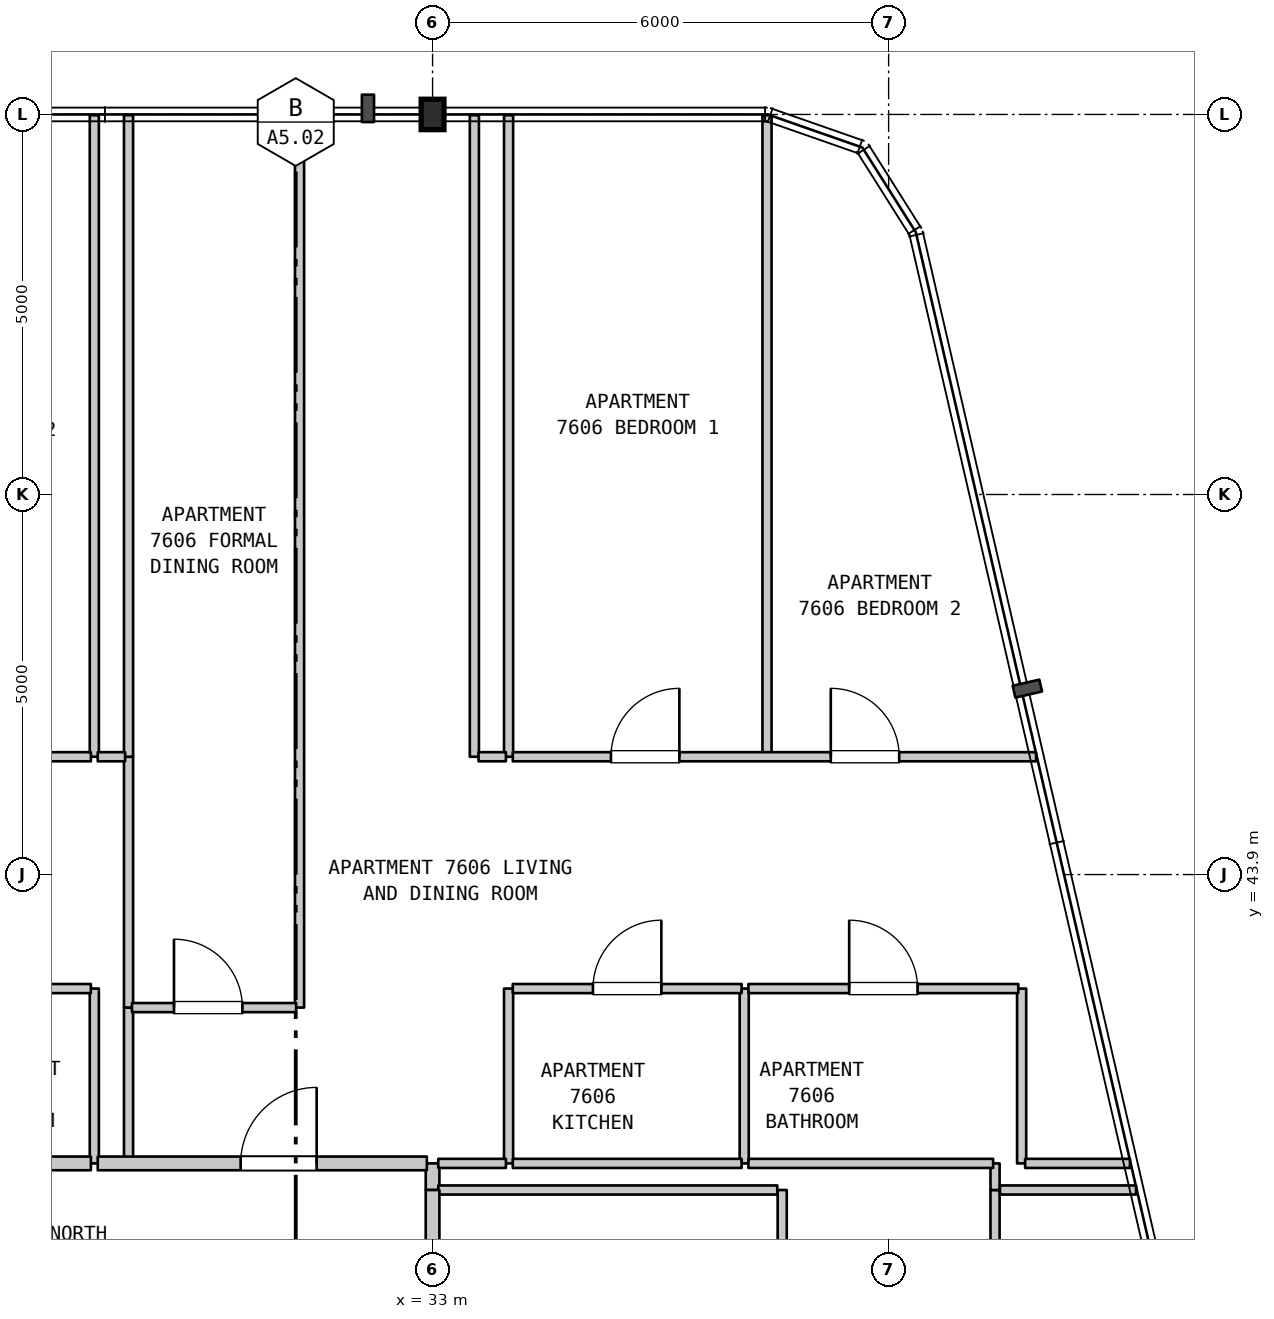
"""IFC4 building model, lengths in metres.
Left out: names, types, materials, properties, quantities, classifications, styles, units other than length and angle.
Written with IfcOpenShell. Run it as: python <this file> out.ifc"""

import sys

from ifc_helpers import new_model, si_unit, direction, frame, frame_2d, origin, origin_2d, place, context, subcontext, project, spatial, rectangle, i_section, extrude, element, fill, save


model = new_model("IFC4")
c1 = context("Model", 3, precision=1e-05, world=origin(), true_north=direction((0.0, 1.0)))
c2 = subcontext(c1, "Body", "Model", "MODEL_VIEW")
j1 = project(units=[si_unit("LENGTHUNIT", "METRE"), si_unit("PLANEANGLEUNIT", "RADIAN")], contexts=[c1])
p1 = place(None, origin())
s1 = spatial("IfcSite", under=j1, at=p1, CompositionType="ELEMENT")
p2 = place(p1, origin())
s2 = spatial("IfcBuilding", under=s1, at=p2, CompositionType="ELEMENT")
p3 = place(p2, frame((0.0, 0.0, 303.6)))
s3 = spatial("IfcBuildingStorey", under=s2, at=p3, CompositionType="ELEMENT", Elevation=303.6)
p4 = place(p3, frame((33.0, 53.9, 0.0), z_axis=(0.0, 0.0, 1.0), x_axis=(1.0, 0.0, 0.0)))
e1 = element("IfcColumn", 1, at=p4, inside=s3, PredefinedType="COLUMN", context=c2, shape_type="SweptSolid", body=[
    extrude(i_section(OverallWidth=0.3, OverallDepth=0.4, WebThickness=0.013, FlangeThickness=0.024, FilletRadius=0.027, at=origin_2d()), origin(), (0.0, 0.0, 1.0), 3.7),
])
p5 = place(p3, frame((28.55, 40.1, 0.0), z_axis=(0.0, 0.0, 1.0), x_axis=(0.0, 1.0, 0.0)))
e2 = element("IfcWall", 2, at=p5, inside=s3, PredefinedType="PARTITIONING", context=c2, shape_type="SweptSolid", body=[
    extrude(rectangle(XDim=2.3, YDim=0.12, at=frame_2d((1.15, 0.0))), origin(), (0.0, 0.0, 1.0), 3.39),
])
p6 = place(p3, frame((28.55, 45.45, 0.0), z_axis=(0.0, 0.0, 1.0), x_axis=(0.0, 1.0, 0.0)))
e3 = element("IfcWall", 3, at=p6, inside=s3, PredefinedType="PARTITIONING", context=c2, shape_type="SweptSolid", body=[
    extrude(rectangle(XDim=8.44, YDim=0.12, at=frame_2d((4.22, 0.0))), origin(), (0.0, 0.0, 1.0), 3.39),
])
p7 = place(p3, frame((29.0, 40.1, 0.0), z_axis=(0.0, 0.0, 1.0), x_axis=(0.0, 1.0, 0.0)))
e4 = element("IfcWall", 4, at=p7, inside=s3, PredefinedType="PARTITIONING", context=c2, shape_type="SweptSolid", body=[
    extrude(rectangle(XDim=2.05, YDim=0.12, at=frame_2d((1.025, 0.0))), origin(), (0.0, 0.0, 1.0), 3.39),
])
p8 = place(p3, frame((29.0, 42.15, 0.0), z_axis=(0.0, 0.0, 1.0), x_axis=(0.0, 1.0, 0.0)))
e5 = element("IfcWall", 5, at=p8, inside=s3, PredefinedType="PARTITIONING", context=c2, shape_type="SweptSolid", body=[
    extrude(rectangle(XDim=3.3, YDim=0.12, at=frame_2d((1.65, 0.0))), origin(), (0.0, 0.0, 1.0), 3.39),
])
p9 = place(p3, frame((29.0, 45.45, 0.0), z_axis=(0.0, 0.0, 1.0), x_axis=(0.0, 1.0, 0.0)))
e6 = element("IfcWall", 6, at=p9, inside=s3, PredefinedType="PARTITIONING", context=c2, shape_type="SweptSolid", body=[
    extrude(rectangle(XDim=8.44, YDim=0.12, at=frame_2d((4.22, 0.0))), origin(), (0.0, 0.0, 1.0), 3.39),
])
p10 = place(p3, frame((31.25, 42.15, 0.0), z_axis=(0.0, 0.0, 1.0), x_axis=(0.0, 1.0, 0.0)))
e7 = element("IfcWall", 7, at=p10, inside=s3, PredefinedType="PARTITIONING", context=c2, shape_type="SweptSolid", body=[
    extrude(rectangle(XDim=11.74, YDim=0.12, at=frame_2d((5.87, 0.0))), origin(), (0.0, 0.0, 1.0), 3.39),
])
p11 = place(p3, frame((33.0, 39.75, 0.0), z_axis=(0.0, 0.0, 1.0), x_axis=(0.0, 1.0, 0.0)))
e8 = element("IfcWall", 8, at=p11, inside=s3, PredefinedType="STANDARD", context=c2, shape_type="SweptSolid", body=[
    extrude(rectangle(XDim=0.35, YDim=0.18, at=frame_2d((0.175, 0.0))), origin(), (0.0, 0.0, 1.0), 3.39),
])
p12 = place(p3, frame((33.55, 45.45, 0.0), z_axis=(0.0, 0.0, 1.0), x_axis=(0.0, 1.0, 0.0)))
e9 = element("IfcWall", 9, at=p12, inside=s3, PredefinedType="PARTITIONING", context=c2, shape_type="SweptSolid", body=[
    extrude(rectangle(XDim=8.44, YDim=0.12, at=frame_2d((4.22, 0.0))), origin(), (0.0, 0.0, 1.0), 3.39),
])
p13 = place(p3, frame((34.0, 40.1, 0.0), z_axis=(0.0, 0.0, 1.0), x_axis=(0.0, 1.0, 0.0)))
e10 = element("IfcWall", 10, at=p13, inside=s3, PredefinedType="PARTITIONING", context=c2, shape_type="SweptSolid", body=[
    extrude(rectangle(XDim=2.3, YDim=0.12, at=frame_2d((1.15, 0.0))), origin(), (0.0, 0.0, 1.0), 3.39),
])
p14 = place(p3, frame((34.0, 45.45, 0.0), z_axis=(0.0, 0.0, 1.0), x_axis=(0.0, 1.0, 0.0)))
e11 = element("IfcWall", 11, at=p14, inside=s3, PredefinedType="PARTITIONING", context=c2, shape_type="SweptSolid", body=[
    extrude(rectangle(XDim=8.44, YDim=0.12, at=frame_2d((4.22, 0.0))), origin(), (0.0, 0.0, 1.0), 3.39),
])
p15 = place(p3, frame((37.1, 40.1, 0.0), z_axis=(0.0, 0.0, 1.0), x_axis=(0.0, 1.0, 0.0)))
e12 = element("IfcWall", 12, at=p15, inside=s3, PredefinedType="PARTITIONING", context=c2, shape_type="SweptSolid", body=[
    extrude(rectangle(XDim=2.3, YDim=0.12, at=frame_2d((1.15, 0.0))), origin(), (0.0, 0.0, 1.0), 3.39),
])
p16 = place(p3, frame((37.4, 45.45, 0.0), z_axis=(0.0, 0.0, 1.0), x_axis=(0.0, 1.0, 0.0)))
e13 = element("IfcWall", 13, at=p16, inside=s3, PredefinedType="PARTITIONING", context=c2, shape_type="SweptSolid", body=[
    extrude(rectangle(XDim=8.44, YDim=0.12, at=frame_2d((4.22, 0.0))), origin(), (0.0, 0.0, 1.0), 3.39),
])
p17 = place(p3, frame((37.6, 37.081, 0.0), z_axis=(0.0, 0.0, 1.0), x_axis=(0.0, 1.0, 0.0)))
e14 = element("IfcWall", 14, at=p17, inside=s3, PredefinedType="PARTITIONING", context=c2, shape_type="SweptSolid", body=[
    extrude(rectangle(XDim=2.669, YDim=0.12, at=frame_2d((1.334, 0.0))), origin(), (0.0, 0.0, 1.0), 3.39),
])
p18 = place(p17, frame((0.814, 0.0, 0.0)))
e15 = element("IfcOpeningElement", 15, at=p18, cuts=e14, PredefinedType="OPENING", context=c2, shape_type="SweptSolid", body=[
    extrude(rectangle(XDim=0.9, YDim=2.15, at=frame_2d((0.45, 1.075))), frame((0.0, 0.07, 0.0), z_axis=(0.0, -1.0, 0.0), x_axis=(1.0, 0.0, 0.0)), (0.0, 0.0, 1.0), 0.14),
])
p19 = place(p3, frame((40.4, 31.9, 0.0), z_axis=(0.0, 0.0, 1.0), x_axis=(0.0, 1.0, 0.0)))
e16 = element("IfcWall", 16, at=p19, inside=s3, PredefinedType="PARTITIONING", context=c2, shape_type="SweptSolid", body=[
    extrude(rectangle(XDim=7.85, YDim=0.12, at=frame_2d((3.925, 0.0))), origin(), (0.0, 0.0, 1.0), 3.39),
])
p20 = place(p19, frame((1.615, 0.0, 0.0)))
e17 = element("IfcOpeningElement", 17, at=p20, cuts=e16, PredefinedType="OPENING", context=c2, shape_type="SweptSolid", body=[
    extrude(rectangle(XDim=0.9, YDim=2.15, at=frame_2d((0.45, 1.075))), frame((0.0, 0.07, 0.0), z_axis=(0.0, -1.0, 0.0), x_axis=(1.0, 0.0, 0.0)), (0.0, 0.0, 1.0), 0.14),
])
p21 = place(p19, frame((5.19, 0.0, 0.0)))
e18 = element("IfcOpeningElement", 18, at=p21, cuts=e16, PredefinedType="OPENING", context=c2, shape_type="SweptSolid", body=[
    extrude(rectangle(XDim=0.9, YDim=2.15, at=frame_2d((0.45, 1.075))), frame((0.0, 0.07, 0.0), z_axis=(0.0, -1.0, 0.0), x_axis=(1.0, 0.0, 0.0)), (0.0, 0.0, 1.0), 0.14),
])
p22 = place(p3, frame((40.4, 39.75, 0.0), z_axis=(0.0, 0.0, 1.0), x_axis=(0.0, 1.0, 0.0)))
e19 = element("IfcWall", 19, at=p22, inside=s3, PredefinedType="PARTITIONING", context=c2, shape_type="SweptSolid", body=[
    extrude(rectangle(XDim=0.35, YDim=0.12, at=frame_2d((0.175, 0.0))), origin(), (0.0, 0.0, 1.0), 3.39),
])
p23 = place(p3, frame((40.75, 40.1, 0.0), z_axis=(0.0, 0.0, 1.0), x_axis=(0.0, 1.0, 0.0)))
e20 = element("IfcWall", 20, at=p23, inside=s3, PredefinedType="PARTITIONING", context=c2, shape_type="SweptSolid", body=[
    extrude(rectangle(XDim=2.3, YDim=0.12, at=frame_2d((1.15, 0.0))), origin(), (0.0, 0.0, 1.0), 3.39),
])
p24 = place(p3, frame((33.075, 39.75, 0.0), z_axis=(0.0, 0.0, 1.0), x_axis=(1.0, 0.0, 0.0)))
e21 = element("IfcWall", 21, at=p24, inside=s3, PredefinedType="PARTITIONING", context=c2, shape_type="SweptSolid", body=[
    extrude(rectangle(XDim=4.46, YDim=0.12, at=frame_2d((2.23, 0.0))), origin(), (0.0, 0.0, 1.0), 3.39),
])
p25 = place(p3, frame((40.465, 39.75, 0.0), z_axis=(0.0, 0.0, 1.0), x_axis=(1.0, 0.0, 0.0)))
e22 = element("IfcWall", 22, at=p25, inside=s3, PredefinedType="PARTITIONING", context=c2, shape_type="SweptSolid", body=[
    extrude(rectangle(XDim=1.79, YDim=0.12, at=frame_2d((0.895, 0.0))), origin(), (0.0, 0.0, 1.0), 3.39),
])
p26 = place(p3, frame((25.22, 40.1, 0.0), z_axis=(0.0, 0.0, 1.0), x_axis=(1.0, 0.0, 0.0)))
e23 = element("IfcWall", 23, at=p26, inside=s3, PredefinedType="STANDARD", context=c2, shape_type="SweptSolid", body=[
    extrude(rectangle(XDim=3.285, YDim=0.18, at=frame_2d((1.643, 0.0))), origin(), (0.0, 0.0, 1.0), 3.39),
])
p27 = place(p3, frame((28.595, 40.1, 0.0), z_axis=(0.0, 0.0, 1.0), x_axis=(1.0, 0.0, 0.0)))
e24 = element("IfcWall", 24, at=p27, inside=s3, PredefinedType="STANDARD", context=c2, shape_type="SweptSolid", body=[
    extrude(rectangle(XDim=4.33, YDim=0.18, at=frame_2d((2.165, 0.0))), origin(), (0.0, 0.0, 1.0), 3.39),
])
p28 = place(p27, frame((1.88, 0.0, 0.0)))
e25 = element("IfcOpeningElement", 25, at=p28, cuts=e24, PredefinedType="OPENING", context=c2, shape_type="SweptSolid", body=[
    extrude(rectangle(XDim=1.0, YDim=2.15, at=frame_2d((0.5, 1.075))), frame((0.0, 0.1, 0.0), z_axis=(0.0, -1.0, 0.0), x_axis=(1.0, 0.0, 0.0)), (0.0, 0.0, 1.0), 0.2),
])
p29 = place(p3, frame((33.075, 40.1, 0.0), z_axis=(0.0, 0.0, 1.0), x_axis=(1.0, 0.0, 0.0)))
e26 = element("IfcWall", 26, at=p29, inside=s3, PredefinedType="PARTITIONING", context=c2, shape_type="SweptSolid", body=[
    extrude(rectangle(XDim=0.89, YDim=0.12, at=frame_2d((0.445, 0.0))), origin(), (0.0, 0.0, 1.0), 3.39),
])
p30 = place(p3, frame((34.055, 40.1, 0.0), z_axis=(0.0, 0.0, 1.0), x_axis=(1.0, 0.0, 0.0)))
e27 = element("IfcWall", 27, at=p30, inside=s3, PredefinedType="PARTITIONING", context=c2, shape_type="SweptSolid", body=[
    extrude(rectangle(XDim=3.011, YDim=0.12, at=frame_2d((1.505, 0.0))), origin(), (0.0, 0.0, 1.0), 3.39),
])
p31 = place(p3, frame((37.156, 40.1, 0.0), z_axis=(0.0, 0.0, 1.0), x_axis=(1.0, 0.0, 0.0)))
e28 = element("IfcWall", 28, at=p31, inside=s3, PredefinedType="PARTITIONING", context=c2, shape_type="SweptSolid", body=[
    extrude(rectangle(XDim=3.219, YDim=0.12, at=frame_2d((1.609, 0.0))), origin(), (0.0, 0.0, 1.0), 3.39),
])
p32 = place(p3, frame((40.796, 40.1, 0.0), z_axis=(0.0, 0.0, 1.0), x_axis=(1.0, 0.0, 0.0)))
e29 = element("IfcWall", 29, at=p32, inside=s3, PredefinedType="PARTITIONING", context=c2, shape_type="SweptSolid", body=[
    extrude(rectangle(XDim=1.379, YDim=0.12, at=frame_2d((0.689, 0.0))), origin(), (0.0, 0.0, 1.0), 3.39),
])
p33 = place(p3, frame((29.045, 42.15, 0.0), z_axis=(0.0, 0.0, 1.0), x_axis=(1.0, 0.0, 0.0)))
e30 = element("IfcWall", 30, at=p33, inside=s3, PredefinedType="PARTITIONING", context=c2, shape_type="SweptSolid", body=[
    extrude(rectangle(XDim=2.16, YDim=0.12, at=frame_2d((1.08, 0.0))), origin(), (0.0, 0.0, 1.0), 3.39),
])
p34 = place(p33, frame((0.553, 0.0, 0.0)))
e31 = element("IfcOpeningElement", 31, at=p34, cuts=e30, PredefinedType="OPENING", context=c2, shape_type="SweptSolid", body=[
    extrude(rectangle(XDim=0.9, YDim=2.15, at=frame_2d((0.45, 1.075))), frame((0.0, 0.07, 0.0), z_axis=(0.0, -1.0, 0.0), x_axis=(1.0, 0.0, 0.0)), (0.0, 0.0, 1.0), 0.14),
])
p35 = place(p3, frame((25.22, 42.4, 0.0), z_axis=(0.0, 0.0, 1.0), x_axis=(1.0, 0.0, 0.0)))
e32 = element("IfcWall", 32, at=p35, inside=s3, PredefinedType="PARTITIONING", context=c2, shape_type="SweptSolid", body=[
    extrude(rectangle(XDim=3.285, YDim=0.12, at=frame_2d((1.643, 0.0))), origin(), (0.0, 0.0, 1.0), 3.39),
])
p36 = place(p35, frame((1.193, 0.0, 0.0)))
e33 = element("IfcOpeningElement", 33, at=p36, cuts=e32, PredefinedType="OPENING", context=c2, shape_type="SweptSolid", body=[
    extrude(rectangle(XDim=0.9, YDim=2.1, at=frame_2d((0.45, 1.05))), frame((0.0, 0.07, 0.0), z_axis=(0.0, -1.0, 0.0), x_axis=(1.0, 0.0, 0.0)), (0.0, 0.0, 1.0), 0.14),
])
p37 = place(p3, frame((34.055, 42.4, 0.0), z_axis=(0.0, 0.0, 1.0), x_axis=(1.0, 0.0, 0.0)))
e34 = element("IfcWall", 34, at=p37, inside=s3, PredefinedType="PARTITIONING", context=c2, shape_type="SweptSolid", body=[
    extrude(rectangle(XDim=3.011, YDim=0.12, at=frame_2d((1.505, 0.0))), origin(), (0.0, 0.0, 1.0), 3.39),
])
p38 = place(p37, frame((1.055, 0.0, 0.0)))
e35 = element("IfcOpeningElement", 35, at=p38, cuts=e34, PredefinedType="OPENING", context=c2, shape_type="SweptSolid", body=[
    extrude(rectangle(XDim=0.9, YDim=2.15, at=frame_2d((0.45, 1.075))), frame((0.0, 0.07, 0.0), z_axis=(0.0, -1.0, 0.0), x_axis=(1.0, 0.0, 0.0)), (0.0, 0.0, 1.0), 0.14),
])
p39 = place(p3, frame((37.156, 42.4, 0.0), z_axis=(0.0, 0.0, 1.0), x_axis=(1.0, 0.0, 0.0)))
e36 = element("IfcWall", 36, at=p39, inside=s3, PredefinedType="PARTITIONING", context=c2, shape_type="SweptSolid", body=[
    extrude(rectangle(XDim=3.55, YDim=0.12, at=frame_2d((1.775, 0.0))), origin(), (0.0, 0.0, 1.0), 3.39),
])
p40 = place(p39, frame((1.325, 0.0, 0.0)))
e37 = element("IfcOpeningElement", 37, at=p40, cuts=e36, PredefinedType="OPENING", context=c2, shape_type="SweptSolid", body=[
    extrude(rectangle(XDim=0.9, YDim=2.1, at=frame_2d((0.45, 1.05))), frame((0.0, 0.07, 0.0), z_axis=(0.0, -1.0, 0.0), x_axis=(1.0, 0.0, 0.0)), (0.0, 0.0, 1.0), 0.14),
])
p41 = place(p3, frame((22.345, 45.45, 0.0), z_axis=(0.0, 0.0, 1.0), x_axis=(1.0, 0.0, 0.0)))
e38 = element("IfcWall", 38, at=p41, inside=s3, PredefinedType="PARTITIONING", context=c2, shape_type="SweptSolid", body=[
    extrude(rectangle(XDim=6.16, YDim=0.12, at=frame_2d((3.08, 0.0))), origin(), (0.0, 0.0, 1.0), 3.39),
])
p42 = place(p41, frame((1.167, 0.0, 0.0)))
e39 = element("IfcOpeningElement", 39, at=p42, cuts=e38, PredefinedType="OPENING", context=c2, shape_type="SweptSolid", body=[
    extrude(rectangle(XDim=0.9, YDim=2.15, at=frame_2d((0.45, 1.075))), frame((0.0, 0.07, 0.0), z_axis=(0.0, -1.0, 0.0), x_axis=(1.0, 0.0, 0.0)), (0.0, 0.0, 1.0), 0.14),
])
p43 = place(p41, frame((3.942, 0.0, 0.0)))
e40 = element("IfcOpeningElement", 40, at=p43, cuts=e38, PredefinedType="OPENING", context=c2, shape_type="SweptSolid", body=[
    extrude(rectangle(XDim=0.9, YDim=2.15, at=frame_2d((0.45, 1.075))), frame((0.0, 0.07, 0.0), z_axis=(0.0, -1.0, 0.0), x_axis=(1.0, 0.0, 0.0)), (0.0, 0.0, 1.0), 0.14),
])
for number, where, z_axis, x_axis in (
    (41, (28.595, 45.45, 0.0), (0.0, 0.0, 1.0), (1.0, 0.0, 0.0)),
    (42, (33.605, 45.45, 0.0), (0.0, 0.0, 1.0), (1.0, 0.0, 0.0)),
):
    element("IfcWall", number, at=place(p3, frame(where, z_axis=z_axis, x_axis=x_axis)), inside=s3, PredefinedType="PARTITIONING", context=c2, shape_type="SweptSolid", body=[
        extrude(rectangle(XDim=0.36, YDim=0.12, at=frame_2d((0.18, 0.0))), origin(), (0.0, 0.0, 1.0), 3.39),
    ])
p44 = place(p3, frame((34.055, 45.45, 0.0), z_axis=(0.0, 0.0, 1.0), x_axis=(1.0, 0.0, 0.0)))
e43 = element("IfcWall", 43, at=p44, inside=s3, PredefinedType="PARTITIONING", context=c2, shape_type="SweptSolid", body=[
    extrude(rectangle(XDim=6.885, YDim=0.12, at=frame_2d((3.442, 0.0))), origin(), (0.0, 0.0, 1.0), 3.39),
])
p45 = place(p44, frame((1.292, 0.0, 0.0)))
e44 = element("IfcOpeningElement", 44, at=p45, cuts=e43, PredefinedType="OPENING", context=c2, shape_type="SweptSolid", body=[
    extrude(rectangle(XDim=0.9, YDim=2.15, at=frame_2d((0.45, 1.075))), frame((0.0, 0.07, 0.0), z_axis=(0.0, -1.0, 0.0), x_axis=(1.0, 0.0, 0.0)), (0.0, 0.0, 1.0), 0.14),
])
p46 = place(p44, frame((4.184, 0.0, 0.0)))
e45 = element("IfcOpeningElement", 45, at=p46, cuts=e43, PredefinedType="OPENING", context=c2, shape_type="SweptSolid", body=[
    extrude(rectangle(XDim=0.9, YDim=2.15, at=frame_2d((0.45, 1.075))), frame((0.0, 0.07, 0.0), z_axis=(0.0, -1.0, 0.0), x_axis=(1.0, 0.0, 0.0)), (0.0, 0.0, 1.0), 0.14),
])
p47 = place(p3, frame((33.0, 37.9, 0.0), z_axis=(0.0, 0.0, 1.0), x_axis=(0.0, 1.0, 0.0)))
e46 = element("IfcWall", 46, at=p47, inside=s3, PredefinedType="STANDARD", context=c2, shape_type="SweptSolid", body=[
    extrude(rectangle(XDim=1.85, YDim=0.18, at=frame_2d((0.925, 0.0))), origin(), (0.0, 0.0, 1.0), 2.79),
])
p48 = place(p28, origin())
e47 = element("IfcDoor", 47, at=p48, inside=s3, OperationType="SINGLE_SWING_RIGHT", PredefinedType="DOOR", context=c2, shape_type="SweptSolid", body=[
    extrude(rectangle(XDim=1.0, YDim=2.15, at=frame_2d((0.5, 1.075))), frame((0.0, 0.025, 0.0), z_axis=(0.0, -1.0, 0.0), x_axis=(1.0, 0.0, 0.0)), (0.0, 0.0, 1.0), 0.05),
])
fill(e25, e47)
p49 = place(p34, origin())
e48 = element("IfcDoor", 48, at=p49, inside=s3, OperationType="SINGLE_SWING_LEFT", PredefinedType="DOOR", context=c2, shape_type="SweptSolid", body=[
    extrude(rectangle(XDim=0.9, YDim=2.15, at=frame_2d((0.45, 1.075))), frame((0.0, 0.025, 0.0), z_axis=(0.0, -1.0, 0.0), x_axis=(1.0, 0.0, 0.0)), (0.0, 0.0, 1.0), 0.05),
])
fill(e31, e48)
p50 = place(p38, origin())
e49 = element("IfcDoor", 49, at=p50, inside=s3, OperationType="SINGLE_SWING_RIGHT", PredefinedType="DOOR", context=c2, shape_type="SweptSolid", body=[
    extrude(rectangle(XDim=0.9, YDim=2.15, at=frame_2d((0.45, 1.075))), frame((0.0, 0.025, 0.0), z_axis=(0.0, -1.0, 0.0), x_axis=(1.0, 0.0, 0.0)), (0.0, 0.0, 1.0), 0.05),
])
fill(e35, e49)
p51 = place(p40, origin())
e50 = element("IfcDoor", 50, at=p51, inside=s3, OperationType="SINGLE_SWING_LEFT", PredefinedType="DOOR", context=c2, shape_type="SweptSolid", body=[
    extrude(rectangle(XDim=0.9, YDim=2.1, at=frame_2d((0.45, 1.05))), frame((0.0, 0.025, 0.0), z_axis=(0.0, -1.0, 0.0), x_axis=(1.0, 0.0, 0.0)), (0.0, 0.0, 1.0), 0.05),
])
fill(e37, e50)
p52 = place(p45, origin())
e51 = element("IfcDoor", 51, at=p52, inside=s3, OperationType="SINGLE_SWING_RIGHT", PredefinedType="DOOR", context=c2, shape_type="SweptSolid", body=[
    extrude(rectangle(XDim=0.9, YDim=2.15, at=frame_2d((0.45, 1.075))), frame((0.0, 0.025, 0.0), z_axis=(0.0, -1.0, 0.0), x_axis=(1.0, 0.0, 0.0)), (0.0, 0.0, 1.0), 0.05),
])
fill(e44, e51)
p53 = place(p46, origin())
e52 = element("IfcDoor", 52, at=p53, inside=s3, OperationType="SINGLE_SWING_LEFT", PredefinedType="DOOR", context=c2, shape_type="SweptSolid", body=[
    extrude(rectangle(XDim=0.9, YDim=2.15, at=frame_2d((0.45, 1.075))), frame((0.0, 0.025, 0.0), z_axis=(0.0, -1.0, 0.0), x_axis=(1.0, 0.0, 0.0)), (0.0, 0.0, 1.0), 0.05),
])
fill(e45, e52)
save(model, sys.argv[1])
